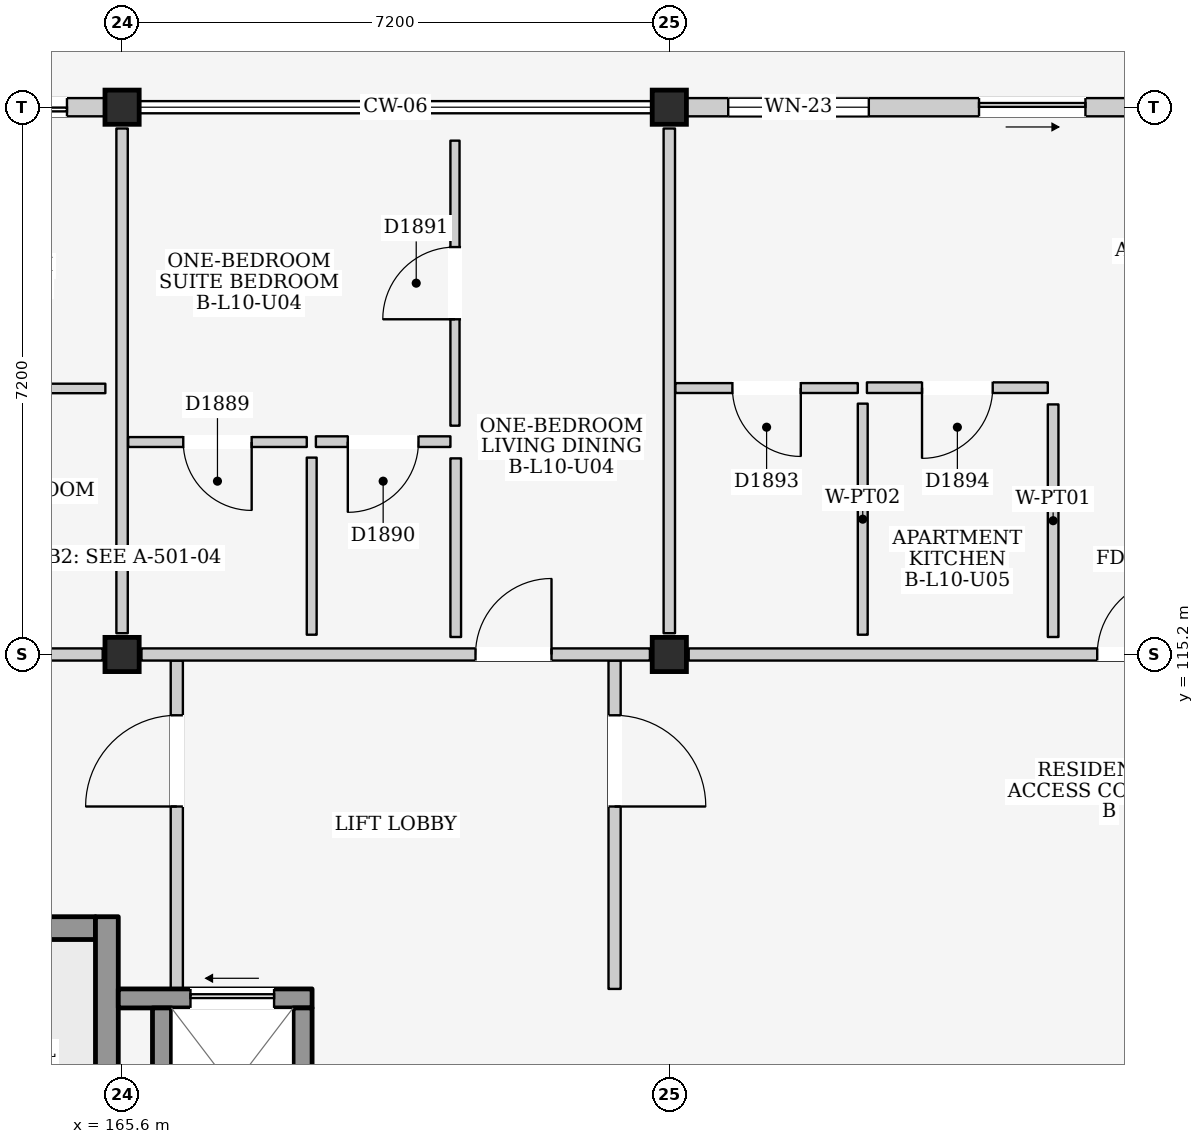
"""IFC4 building model, lengths in metres.
Left out: names, types, materials, properties, quantities, classifications, styles, units other than length and angle.
Written with IfcOpenShell. Run it as: python <this file> out.ifc"""

import sys

from ifc_helpers import new_model, si_unit, direction, frame, frame_2d, origin, origin_2d, place, context, subcontext, project, spatial, rectangle, extrude, element, fill, save


model = new_model("IFC4")
c1 = context("Model", 3, precision=1e-05, world=origin(), true_north=direction((0.0, 1.0)))
c2 = subcontext(c1, "Body", "Model", "MODEL_VIEW")
j1 = project(units=[si_unit("LENGTHUNIT", "METRE"), si_unit("PLANEANGLEUNIT", "RADIAN")], contexts=[c1])
p1 = place(None, origin())
s1 = spatial("IfcSite", under=j1, at=p1, CompositionType="ELEMENT")
p2 = place(p1, origin())
s2 = spatial("IfcBuilding", under=s1, at=p2, CompositionType="ELEMENT")
p3 = place(p2, frame((0.0, 0.0, 34.8)))
s3 = spatial("IfcBuildingStorey", under=s2, at=p3, CompositionType="ELEMENT", Elevation=34.8)
for number, where, z_axis, x_axis in (
    (1, (165.6, 115.2, 0.0), (0.0, 0.0, 1.0), (1.0, 0.0, 0.0)),
    (2, (165.6, 122.4, 0.0), (0.0, 0.0, 1.0), (1.0, 0.0, 0.0)),
    (3, (172.8, 115.2, 0.0), (0.0, 0.0, 1.0), (1.0, 0.0, 0.0)),
    (4, (172.8, 122.4, 0.0), (0.0, 0.0, 1.0), (1.0, 0.0, 0.0)),
):
    element("IfcColumn", number, at=place(p3, frame(where, z_axis=z_axis, x_axis=x_axis)), inside=s3, PredefinedType="COLUMN", context=c2, shape_type="SweptSolid", body=[
        extrude(rectangle(XDim=0.45, YDim=0.45, at=origin_2d()), origin(), (0.0, 0.0, 1.0), 3.2),
    ])
p4 = place(p3, frame((158.625, 122.4, 0.0), z_axis=(0.0, 0.0, 1.0), x_axis=(1.0, 0.0, 0.0)))
e5 = element("IfcWall", 5, at=p4, inside=s3, PredefinedType="ELEMENTEDWALL", context=c2, shape_type="SweptSolid", body=[
    extrude(rectangle(XDim=6.75, YDim=0.24, at=frame_2d((3.375, 0.0))), origin(), (0.0, 0.0, 1.0), 2.495),
])
p5 = place(p4, frame((3.85, 0.0, 0.0)))
e6 = element("IfcOpeningElement", 6, at=p5, cuts=e5, PredefinedType="OPENING", context=c2, shape_type="SweptSolid", body=[
    extrude(rectangle(XDim=2.4, YDim=2.12, at=frame_2d((1.2, 1.06))), frame((0.0, 0.135, 0.0), z_axis=(0.0, -1.0, 0.0), x_axis=(1.0, 0.0, 0.0)), (0.0, 0.0, 1.0), 0.27),
])
p6 = place(p4, frame((0.55, 0.0, 0.785)))
e7 = element("IfcOpeningElement", 7, at=p6, cuts=e5, PredefinedType="OPENING", context=c2, shape_type="SweptSolid", body=[
    extrude(rectangle(XDim=2.3, YDim=1.6, at=frame_2d((1.15, 0.8))), frame((0.0, 0.135, 0.0), z_axis=(0.0, -1.0, 0.0), x_axis=(1.0, 0.0, 0.0)), (0.0, 0.0, 1.0), 0.27),
])
p7 = place(p3, frame((173.025, 122.4, 0.0), z_axis=(0.0, 0.0, 1.0), x_axis=(1.0, 0.0, 0.0)))
e8 = element("IfcWall", 8, at=p7, inside=s3, PredefinedType="ELEMENTEDWALL", context=c2, shape_type="SweptSolid", body=[
    extrude(rectangle(XDim=6.75, YDim=0.24, at=frame_2d((3.375, 0.0))), origin(), (0.0, 0.0, 1.0), 2.495),
])
p8 = place(p7, frame((3.85, 0.0, 0.0)))
e9 = element("IfcOpeningElement", 9, at=p8, cuts=e8, PredefinedType="OPENING", context=c2, shape_type="SweptSolid", body=[
    extrude(rectangle(XDim=1.4, YDim=2.1, at=frame_2d((0.7, 1.05))), frame((0.0, 0.135, 0.0), z_axis=(0.0, -1.0, 0.0), x_axis=(1.0, 0.0, 0.0)), (0.0, 0.0, 1.0), 0.27),
])
p9 = place(p7, frame((0.55, 0.0, 0.9)))
e10 = element("IfcOpeningElement", 10, at=p9, cuts=e8, PredefinedType="OPENING", context=c2, shape_type="SweptSolid", body=[
    extrude(rectangle(XDim=1.85, YDim=1.4, at=frame_2d((0.925, 0.7))), frame((0.0, 0.135, 0.0), z_axis=(0.0, -1.0, 0.0), x_axis=(1.0, 0.0, 0.0)), (0.0, 0.0, 1.0), 0.27),
])
p10 = place(p3, frame((158.75, 111.6, 0.0), z_axis=(0.0, 0.0, 1.0), x_axis=(1.0, 0.0, 0.0)))
e11 = element("IfcWall", 11, at=p10, inside=s3, PredefinedType="SHEAR", context=c2, shape_type="SweptSolid", body=[
    extrude(rectangle(XDim=6.5, YDim=0.3, at=frame_2d((3.25, 0.0))), origin(), (0.0, 0.0, 1.0), 2.96),
])
p11 = place(p10, frame((0.18, 0.0, 0.0)))
e12 = element("IfcOpeningElement", 12, at=p11, cuts=e11, PredefinedType="OPENING", context=c2, shape_type="SweptSolid", body=[
    extrude(rectangle(XDim=1.15, YDim=2.2, at=frame_2d((0.575, 1.1))), frame((0.0, 0.165, 0.0), z_axis=(0.0, -1.0, 0.0), x_axis=(1.0, 0.0, 0.0)), (0.0, 0.0, 1.0), 0.33),
])
p12 = place(p3, frame((165.4, 108.15, 0.0), z_axis=(0.0, 0.0, 1.0), x_axis=(0.0, 1.0, 0.0)))
e13 = element("IfcWall", 13, at=p12, inside=s3, PredefinedType="SHEAR", context=c2, shape_type="SweptSolid", body=[
    extrude(rectangle(XDim=3.6, YDim=0.3, at=frame_2d((1.8, 0.0))), origin(), (0.0, 0.0, 1.0), 2.96),
])
p13 = place(p3, frame((166.32, 110.8, 0.0), z_axis=(0.0, 0.0, 1.0), x_axis=(0.0, 1.0, 0.0)))
e14 = element("IfcWall", 14, at=p13, inside=s3, PredefinedType="PARTITIONING", context=c2, shape_type="SweptSolid", body=[
    extrude(rectangle(XDim=4.32, YDim=0.16, at=frame_2d((2.16, 0.0))), origin(), (0.0, 0.0, 1.0), 2.96),
])
p14 = place(p13, frame((2.4, 0.0, 0.0)))
e15 = element("IfcOpeningElement", 15, at=p14, cuts=e14, PredefinedType="OPENING", context=c2, shape_type="SweptSolid", body=[
    extrude(rectangle(XDim=1.2, YDim=2.2, at=frame_2d((0.6, 1.1))), frame((0.0, 0.095, 0.0), z_axis=(0.0, -1.0, 0.0), x_axis=(1.0, 0.0, 0.0)), (0.0, 0.0, 1.0), 0.19),
])
p15 = place(p3, frame((172.08, 110.8, 0.0), z_axis=(0.0, 0.0, 1.0), x_axis=(0.0, 1.0, 0.0)))
e16 = element("IfcWall", 16, at=p15, inside=s3, PredefinedType="PARTITIONING", context=c2, shape_type="SweptSolid", body=[
    extrude(rectangle(XDim=4.32, YDim=0.16, at=frame_2d((2.16, 0.0))), origin(), (0.0, 0.0, 1.0), 2.96),
])
p16 = place(p15, frame((2.4, 0.0, 0.0)))
e17 = element("IfcOpeningElement", 17, at=p16, cuts=e16, PredefinedType="OPENING", context=c2, shape_type="SweptSolid", body=[
    extrude(rectangle(XDim=1.2, YDim=2.2, at=frame_2d((0.6, 1.1))), frame((0.0, 0.095, 0.0), z_axis=(0.0, -1.0, 0.0), x_axis=(1.0, 0.0, 0.0)), (0.0, 0.0, 1.0), 0.19),
])
p17 = place(p3, frame((165.55, 110.675, 0.0), z_axis=(0.0, 0.0, 1.0), x_axis=(1.0, 0.0, 0.0)))
e18 = element("IfcWall", 18, at=p17, inside=s3, PredefinedType="SHEAR", context=c2, shape_type="SweptSolid", body=[
    extrude(rectangle(XDim=2.55, YDim=0.25, at=frame_2d((1.275, 0.0))), origin(), (0.0, 0.0, 1.0), 2.96),
])
p18 = place(p17, frame((0.95, 0.0, 0.0)))
e19 = element("IfcOpeningElement", 19, at=p18, cuts=e18, PredefinedType="OPENING", context=c2, shape_type="SweptSolid", body=[
    extrude(rectangle(XDim=1.1, YDim=2.15, at=frame_2d((0.55, 1.075))), frame((0.0, 0.14, 0.0), z_axis=(0.0, -1.0, 0.0), x_axis=(1.0, 0.0, 0.0)), (0.0, 0.0, 1.0), 0.28),
])
for number, where, z_axis, x_axis in (
    (20, (166.125, 108.45, 0.0), (0.0, 0.0, 1.0), (0.0, 1.0, 0.0)),
    (21, (167.975, 108.45, 0.0), (0.0, 0.0, 1.0), (0.0, 1.0, 0.0)),
):
    element("IfcWall", number, at=place(p3, frame(where, z_axis=z_axis, x_axis=x_axis)), inside=s3, PredefinedType="SHEAR", context=c2, shape_type="SweptSolid", body=[
        extrude(rectangle(XDim=2.1, YDim=0.25, at=frame_2d((1.05, 0.0))), origin(), (0.0, 0.0, 1.0), 2.96),
    ])
p19 = place(p3, frame((158.655, 115.2, 0.0), z_axis=(0.0, 0.0, 1.0), x_axis=(1.0, 0.0, 0.0)))
e22 = element("IfcWall", 22, at=p19, inside=s3, PredefinedType="PARTITIONING", context=c2, shape_type="SweptSolid", body=[
    extrude(rectangle(XDim=6.69, YDim=0.16, at=frame_2d((3.345, 0.0))), origin(), (0.0, 0.0, 1.0), 2.345),
])
p20 = place(p3, frame((165.6, 115.48, 0.0), z_axis=(0.0, 0.0, 1.0), x_axis=(0.0, 1.0, 0.0)))
e23 = element("IfcWall", 23, at=p20, inside=s3, PredefinedType="PARTITIONING", context=c2, shape_type="SweptSolid", body=[
    extrude(rectangle(XDim=6.64, YDim=0.15, at=frame_2d((3.32, 0.0))), origin(), (0.0, 0.0, 1.0), 2.445),
])
p21 = place(p3, frame((161.32, 118.7, 0.0), z_axis=(0.0, 0.0, 1.0), x_axis=(1.0, 0.0, 0.0)))
e24 = element("IfcWall", 24, at=p21, inside=s3, PredefinedType="PARTITIONING", context=c2, shape_type="SweptSolid", body=[
    extrude(rectangle(XDim=4.06, YDim=0.125, at=frame_2d((2.03, 0.0))), origin(), (0.0, 0.0, 1.0), 2.96),
])
p22 = place(p3, frame((165.855, 115.2, 0.0), z_axis=(0.0, 0.0, 1.0), x_axis=(1.0, 0.0, 0.0)))
e25 = element("IfcWall", 25, at=p22, inside=s3, PredefinedType="PARTITIONING", context=c2, shape_type="SweptSolid", body=[
    extrude(rectangle(XDim=6.69, YDim=0.16, at=frame_2d((3.345, 0.0))), origin(), (0.0, 0.0, 1.0), 2.345),
])
p23 = place(p22, frame((4.395, 0.0, 0.0)))
e26 = element("IfcOpeningElement", 26, at=p23, cuts=e25, PredefinedType="OPENING", context=c2, shape_type="SweptSolid", body=[
    extrude(rectangle(XDim=1.0, YDim=2.15, at=frame_2d((0.5, 1.075))), frame((0.0, 0.095, 0.0), z_axis=(0.0, -1.0, 0.0), x_axis=(1.0, 0.0, 0.0)), (0.0, 0.0, 1.0), 0.19),
])
p24 = place(p3, frame((172.8, 115.48, 0.0), z_axis=(0.0, 0.0, 1.0), x_axis=(0.0, 1.0, 0.0)))
e27 = element("IfcWall", 27, at=p24, inside=s3, PredefinedType="PARTITIONING", context=c2, shape_type="SweptSolid", body=[
    extrude(rectangle(XDim=6.64, YDim=0.15, at=frame_2d((3.32, 0.0))), origin(), (0.0, 0.0, 1.0), 2.445),
])
p25 = place(p3, frame((165.68, 117.995, 0.0), z_axis=(0.0, 0.0, 1.0), x_axis=(1.0, 0.0, 0.0)))
e28 = element("IfcWall", 28, at=p25, inside=s3, PredefinedType="PARTITIONING", context=c2, shape_type="SweptSolid", body=[
    extrude(rectangle(XDim=2.35, YDim=0.13, at=frame_2d((1.175, 0.0))), origin(), (0.0, 0.0, 1.0), 2.96),
])
p26 = place(p25, frame((0.725, 0.0, 0.0)))
e29 = element("IfcOpeningElement", 29, at=p26, cuts=e28, PredefinedType="OPENING", context=c2, shape_type="SweptSolid", body=[
    extrude(rectangle(XDim=0.9, YDim=2.1, at=frame_2d((0.45, 1.05))), frame((0.0, 0.08, 0.0), z_axis=(0.0, -1.0, 0.0), x_axis=(1.0, 0.0, 0.0)), (0.0, 0.0, 1.0), 0.16),
])
p27 = place(p3, frame((168.095, 115.46, 0.0), z_axis=(0.0, 0.0, 1.0), x_axis=(0.0, 1.0, 0.0)))
e30 = element("IfcWall", 30, at=p27, inside=s3, PredefinedType="PARTITIONING", context=c2, shape_type="SweptSolid", body=[
    extrude(rectangle(XDim=2.33, YDim=0.13, at=frame_2d((1.165, 0.0))), origin(), (0.0, 0.0, 1.0), 2.96),
])
p28 = place(p3, frame((168.15, 118.0, 0.0), z_axis=(0.0, 0.0, 1.0), x_axis=(1.0, 0.0, 0.0)))
e31 = element("IfcWall", 31, at=p28, inside=s3, PredefinedType="PARTITIONING", context=c2, shape_type="SweptSolid", body=[
    extrude(rectangle(XDim=1.77, YDim=0.14, at=frame_2d((0.885, 0.0))), origin(), (0.0, 0.0, 1.0), 2.96),
])
p29 = place(p28, frame((0.42, 0.0, 0.0)))
e32 = element("IfcOpeningElement", 32, at=p29, cuts=e31, PredefinedType="OPENING", context=c2, shape_type="SweptSolid", body=[
    extrude(rectangle(XDim=0.93, YDim=2.14, at=frame_2d((0.465, 1.07))), frame((0.0, 0.085, 0.0), z_axis=(0.0, -1.0, 0.0), x_axis=(1.0, 0.0, 0.0)), (0.0, 0.0, 1.0), 0.17),
])
p30 = place(p3, frame((169.99, 115.43, 0.0), z_axis=(0.0, 0.0, 1.0), x_axis=(0.0, 1.0, 0.0)))
e33 = element("IfcWall", 33, at=p30, inside=s3, PredefinedType="PARTITIONING", context=c2, shape_type="SweptSolid", body=[
    extrude(rectangle(XDim=2.35, YDim=0.14, at=frame_2d((1.175, 0.0))), origin(), (0.0, 0.0, 1.0), 2.96),
])
p31 = place(p3, frame((169.98, 118.21, 0.0), z_axis=(0.0, 0.0, 1.0), x_axis=(0.0, 1.0, 0.0)))
e34 = element("IfcWall", 34, at=p31, inside=s3, PredefinedType="PARTITIONING", context=c2, shape_type="SweptSolid", body=[
    extrude(rectangle(XDim=3.75, YDim=0.12, at=frame_2d((1.875, 0.0))), origin(), (0.0, 0.0, 1.0), 2.96),
])
p32 = place(p31, frame((1.4, 0.0, 0.0)))
e35 = element("IfcOpeningElement", 35, at=p32, cuts=e34, PredefinedType="OPENING", context=c2, shape_type="SweptSolid", body=[
    extrude(rectangle(XDim=0.95, YDim=2.15, at=frame_2d((0.475, 1.075))), frame((0.0, 0.075, 0.0), z_axis=(0.0, -1.0, 0.0), x_axis=(1.0, 0.0, 0.0)), (0.0, 0.0, 1.0), 0.15),
])
p33 = place(p3, frame((173.055, 115.2, 0.0), z_axis=(0.0, 0.0, 1.0), x_axis=(1.0, 0.0, 0.0)))
e36 = element("IfcWall", 36, at=p33, inside=s3, PredefinedType="PARTITIONING", context=c2, shape_type="SweptSolid", body=[
    extrude(rectangle(XDim=6.69, YDim=0.16, at=frame_2d((3.345, 0.0))), origin(), (0.0, 0.0, 1.0), 2.345),
])
p34 = place(p33, frame((5.375, 0.0, 0.0)))
e37 = element("IfcOpeningElement", 37, at=p34, cuts=e36, PredefinedType="OPENING", context=c2, shape_type="SweptSolid", body=[
    extrude(rectangle(XDim=1.0, YDim=2.15, at=frame_2d((0.5, 1.075))), frame((0.0, 0.095, 0.0), z_axis=(0.0, -1.0, 0.0), x_axis=(1.0, 0.0, 0.0)), (0.0, 0.0, 1.0), 0.19),
])
p35 = place(p3, frame((172.88, 118.705, 0.0), z_axis=(0.0, 0.0, 1.0), x_axis=(1.0, 0.0, 0.0)))
e38 = element("IfcWall", 38, at=p35, inside=s3, PredefinedType="PARTITIONING", context=c2, shape_type="SweptSolid", body=[
    extrude(rectangle(XDim=2.4, YDim=0.13, at=frame_2d((1.2, 0.0))), origin(), (0.0, 0.0, 1.0), 2.96),
])
p36 = place(p35, frame((0.75, 0.0, 0.0)))
e39 = element("IfcOpeningElement", 39, at=p36, cuts=e38, PredefinedType="OPENING", context=c2, shape_type="SweptSolid", body=[
    extrude(rectangle(XDim=0.9, YDim=2.1, at=frame_2d((0.45, 1.05))), frame((0.0, 0.08, 0.0), z_axis=(0.0, -1.0, 0.0), x_axis=(1.0, 0.0, 0.0)), (0.0, 0.0, 1.0), 0.16),
])
p37 = place(p3, frame((175.345, 115.46, 0.0), z_axis=(0.0, 0.0, 1.0), x_axis=(0.0, 1.0, 0.0)))
e40 = element("IfcWall", 40, at=p37, inside=s3, PredefinedType="PARTITIONING", context=c2, shape_type="SweptSolid", body=[
    extrude(rectangle(XDim=3.04, YDim=0.13, at=frame_2d((1.52, 0.0))), origin(), (0.0, 0.0, 1.0), 2.96),
])
p38 = place(p3, frame((175.4, 118.71, 0.0), z_axis=(0.0, 0.0, 1.0), x_axis=(1.0, 0.0, 0.0)))
e41 = element("IfcWall", 41, at=p38, inside=s3, PredefinedType="PARTITIONING", context=c2, shape_type="SweptSolid", body=[
    extrude(rectangle(XDim=2.38, YDim=0.14, at=frame_2d((1.19, 0.0))), origin(), (0.0, 0.0, 1.0), 2.96),
])
p39 = place(p38, frame((0.725, 0.0, 0.0)))
e42 = element("IfcOpeningElement", 42, at=p39, cuts=e41, PredefinedType="OPENING", context=c2, shape_type="SweptSolid", body=[
    extrude(rectangle(XDim=0.93, YDim=2.14, at=frame_2d((0.465, 1.07))), frame((0.0, 0.085, 0.0), z_axis=(0.0, -1.0, 0.0), x_axis=(1.0, 0.0, 0.0)), (0.0, 0.0, 1.0), 0.17),
])
p40 = place(p3, frame((177.85, 115.43, 0.0), z_axis=(0.0, 0.0, 1.0), x_axis=(0.0, 1.0, 0.0)))
e43 = element("IfcWall", 43, at=p40, inside=s3, PredefinedType="PARTITIONING", context=c2, shape_type="SweptSolid", body=[
    extrude(rectangle(XDim=3.06, YDim=0.14, at=frame_2d((1.53, 0.0))), origin(), (0.0, 0.0, 1.0), 2.96),
])
p41 = place(p5, frame((2.4, 0.0, 0.0), z_axis=(0.0, 0.0, 1.0), x_axis=(-1.0, 0.0, 0.0)))
e44 = element("IfcDoor", 44, at=p41, inside=s3, OperationType="DOUBLE_DOOR_SLIDING", PredefinedType="DOOR", context=c2, shape_type="SweptSolid", body=[
    extrude(rectangle(XDim=2.4, YDim=2.12, at=frame_2d((1.2, 1.06))), frame((0.0, 0.025, 0.0), z_axis=(0.0, -1.0, 0.0), x_axis=(1.0, 0.0, 0.0)), (0.0, 0.0, 1.0), 0.05),
])
fill(e6, e44)
p42 = place(p8, frame((1.4, 0.0, 0.0), z_axis=(0.0, 0.0, 1.0), x_axis=(-1.0, 0.0, 0.0)))
e45 = element("IfcDoor", 45, at=p42, inside=s3, OperationType="SLIDING_TO_RIGHT", PredefinedType="DOOR", context=c2, shape_type="SweptSolid", body=[
    extrude(rectangle(XDim=1.4, YDim=2.1, at=frame_2d((0.7, 1.05))), frame((0.0, 0.025, 0.0), z_axis=(0.0, -1.0, 0.0), x_axis=(1.0, 0.0, 0.0)), (0.0, 0.0, 1.0), 0.05),
])
fill(e9, e45)
p43 = place(p9, origin())
e46 = element("IfcWindow", 46, at=p43, inside=s3, PartitioningType="DOUBLE_PANEL_VERTICAL", PredefinedType="WINDOW", context=c2, shape_type="SweptSolid", body=[
    extrude(rectangle(XDim=1.85, YDim=1.4, at=frame_2d((0.925, 0.7))), frame((0.0, 0.03, 0.0), z_axis=(0.0, -1.0, 0.0), x_axis=(1.0, 0.0, 0.0)), (0.0, 0.0, 1.0), 0.06),
])
fill(e10, e46)
p44 = place(p14, origin())
e47 = element("IfcDoor", 47, at=p44, inside=s3, OperationType="SINGLE_SWING_LEFT", PredefinedType="DOOR", context=c2, shape_type="SweptSolid", body=[
    extrude(rectangle(XDim=1.2, YDim=2.2, at=frame_2d((0.6, 1.1))), frame((0.0, 0.025, 0.0), z_axis=(0.0, -1.0, 0.0), x_axis=(1.0, 0.0, 0.0)), (0.0, 0.0, 1.0), 0.05),
])
fill(e15, e47)
p45 = place(p16, frame((1.2, 0.0, 0.0), z_axis=(0.0, 0.0, 1.0), x_axis=(-1.0, 0.0, 0.0)))
e48 = element("IfcDoor", 48, at=p45, inside=s3, OperationType="SINGLE_SWING_RIGHT", PredefinedType="DOOR", context=c2, shape_type="SweptSolid", body=[
    extrude(rectangle(XDim=1.2, YDim=2.2, at=frame_2d((0.6, 1.1))), frame((0.0, 0.025, 0.0), z_axis=(0.0, -1.0, 0.0), x_axis=(1.0, 0.0, 0.0)), (0.0, 0.0, 1.0), 0.05),
])
fill(e17, e48)
p46 = place(p18, origin())
e49 = element("IfcDoor", 49, at=p46, inside=s3, OperationType="SLIDING_TO_LEFT", PredefinedType="DOOR", context=c2, shape_type="SweptSolid", body=[
    extrude(rectangle(XDim=1.1, YDim=2.15, at=frame_2d((0.55, 1.075))), frame((0.0, 0.025, 0.0), z_axis=(0.0, -1.0, 0.0), x_axis=(1.0, 0.0, 0.0)), (0.0, 0.0, 1.0), 0.05),
])
fill(e19, e49)
p47 = place(p23, origin())
e50 = element("IfcDoor", 50, at=p47, inside=s3, OperationType="SINGLE_SWING_RIGHT", PredefinedType="DOOR", context=c2, shape_type="SweptSolid", body=[
    extrude(rectangle(XDim=1.0, YDim=2.15, at=frame_2d((0.5, 1.075))), frame((0.0, 0.025, 0.0), z_axis=(0.0, -1.0, 0.0), x_axis=(1.0, 0.0, 0.0)), (0.0, 0.0, 1.0), 0.05),
])
fill(e26, e50)
p48 = place(p26, frame((0.9, 0.0, 0.0), z_axis=(0.0, 0.0, 1.0), x_axis=(-1.0, 0.0, 0.0)))
e51 = element("IfcDoor", 51, at=p48, inside=s3, OperationType="SINGLE_SWING_LEFT", PredefinedType="DOOR", context=c2, shape_type="SweptSolid", body=[
    extrude(rectangle(XDim=0.9, YDim=2.1, at=frame_2d((0.45, 1.05))), frame((0.0, 0.025, 0.0), z_axis=(0.0, -1.0, 0.0), x_axis=(1.0, 0.0, 0.0)), (0.0, 0.0, 1.0), 0.05),
])
fill(e29, e51)
p49 = place(p29, frame((0.93, 0.0, 0.0), z_axis=(0.0, 0.0, 1.0), x_axis=(-1.0, 0.0, 0.0)))
e52 = element("IfcDoor", 52, at=p49, inside=s3, OperationType="SINGLE_SWING_RIGHT", PredefinedType="DOOR", context=c2, shape_type="SweptSolid", body=[
    extrude(rectangle(XDim=0.93, YDim=2.14, at=frame_2d((0.465, 1.07))), frame((0.0, 0.025, 0.0), z_axis=(0.0, -1.0, 0.0), x_axis=(1.0, 0.0, 0.0)), (0.0, 0.0, 1.0), 0.05),
])
fill(e32, e52)
p50 = place(p32, origin())
e53 = element("IfcDoor", 53, at=p50, inside=s3, OperationType="SINGLE_SWING_LEFT", PredefinedType="DOOR", context=c2, shape_type="SweptSolid", body=[
    extrude(rectangle(XDim=0.95, YDim=2.15, at=frame_2d((0.475, 1.075))), frame((0.0, 0.025, 0.0), z_axis=(0.0, -1.0, 0.0), x_axis=(1.0, 0.0, 0.0)), (0.0, 0.0, 1.0), 0.05),
])
fill(e35, e53)
p51 = place(p34, origin())
e54 = element("IfcDoor", 54, at=p51, inside=s3, OperationType="SINGLE_SWING_RIGHT", PredefinedType="DOOR", context=c2, shape_type="SweptSolid", body=[
    extrude(rectangle(XDim=1.0, YDim=2.15, at=frame_2d((0.5, 1.075))), frame((0.0, 0.025, 0.0), z_axis=(0.0, -1.0, 0.0), x_axis=(1.0, 0.0, 0.0)), (0.0, 0.0, 1.0), 0.05),
])
fill(e37, e54)
p52 = place(p36, frame((0.9, 0.0, 0.0), z_axis=(0.0, 0.0, 1.0), x_axis=(-1.0, 0.0, 0.0)))
e55 = element("IfcDoor", 55, at=p52, inside=s3, OperationType="SINGLE_SWING_LEFT", PredefinedType="DOOR", context=c2, shape_type="SweptSolid", body=[
    extrude(rectangle(XDim=0.9, YDim=2.1, at=frame_2d((0.45, 1.05))), frame((0.0, 0.025, 0.0), z_axis=(0.0, -1.0, 0.0), x_axis=(1.0, 0.0, 0.0)), (0.0, 0.0, 1.0), 0.05),
])
fill(e39, e55)
p53 = place(p39, frame((0.93, 0.0, 0.0), z_axis=(0.0, 0.0, 1.0), x_axis=(-1.0, 0.0, 0.0)))
e56 = element("IfcDoor", 56, at=p53, inside=s3, OperationType="SINGLE_SWING_RIGHT", PredefinedType="DOOR", context=c2, shape_type="SweptSolid", body=[
    extrude(rectangle(XDim=0.93, YDim=2.14, at=frame_2d((0.465, 1.07))), frame((0.0, 0.025, 0.0), z_axis=(0.0, -1.0, 0.0), x_axis=(1.0, 0.0, 0.0)), (0.0, 0.0, 1.0), 0.05),
])
fill(e42, e56)
save(model, sys.argv[1])
